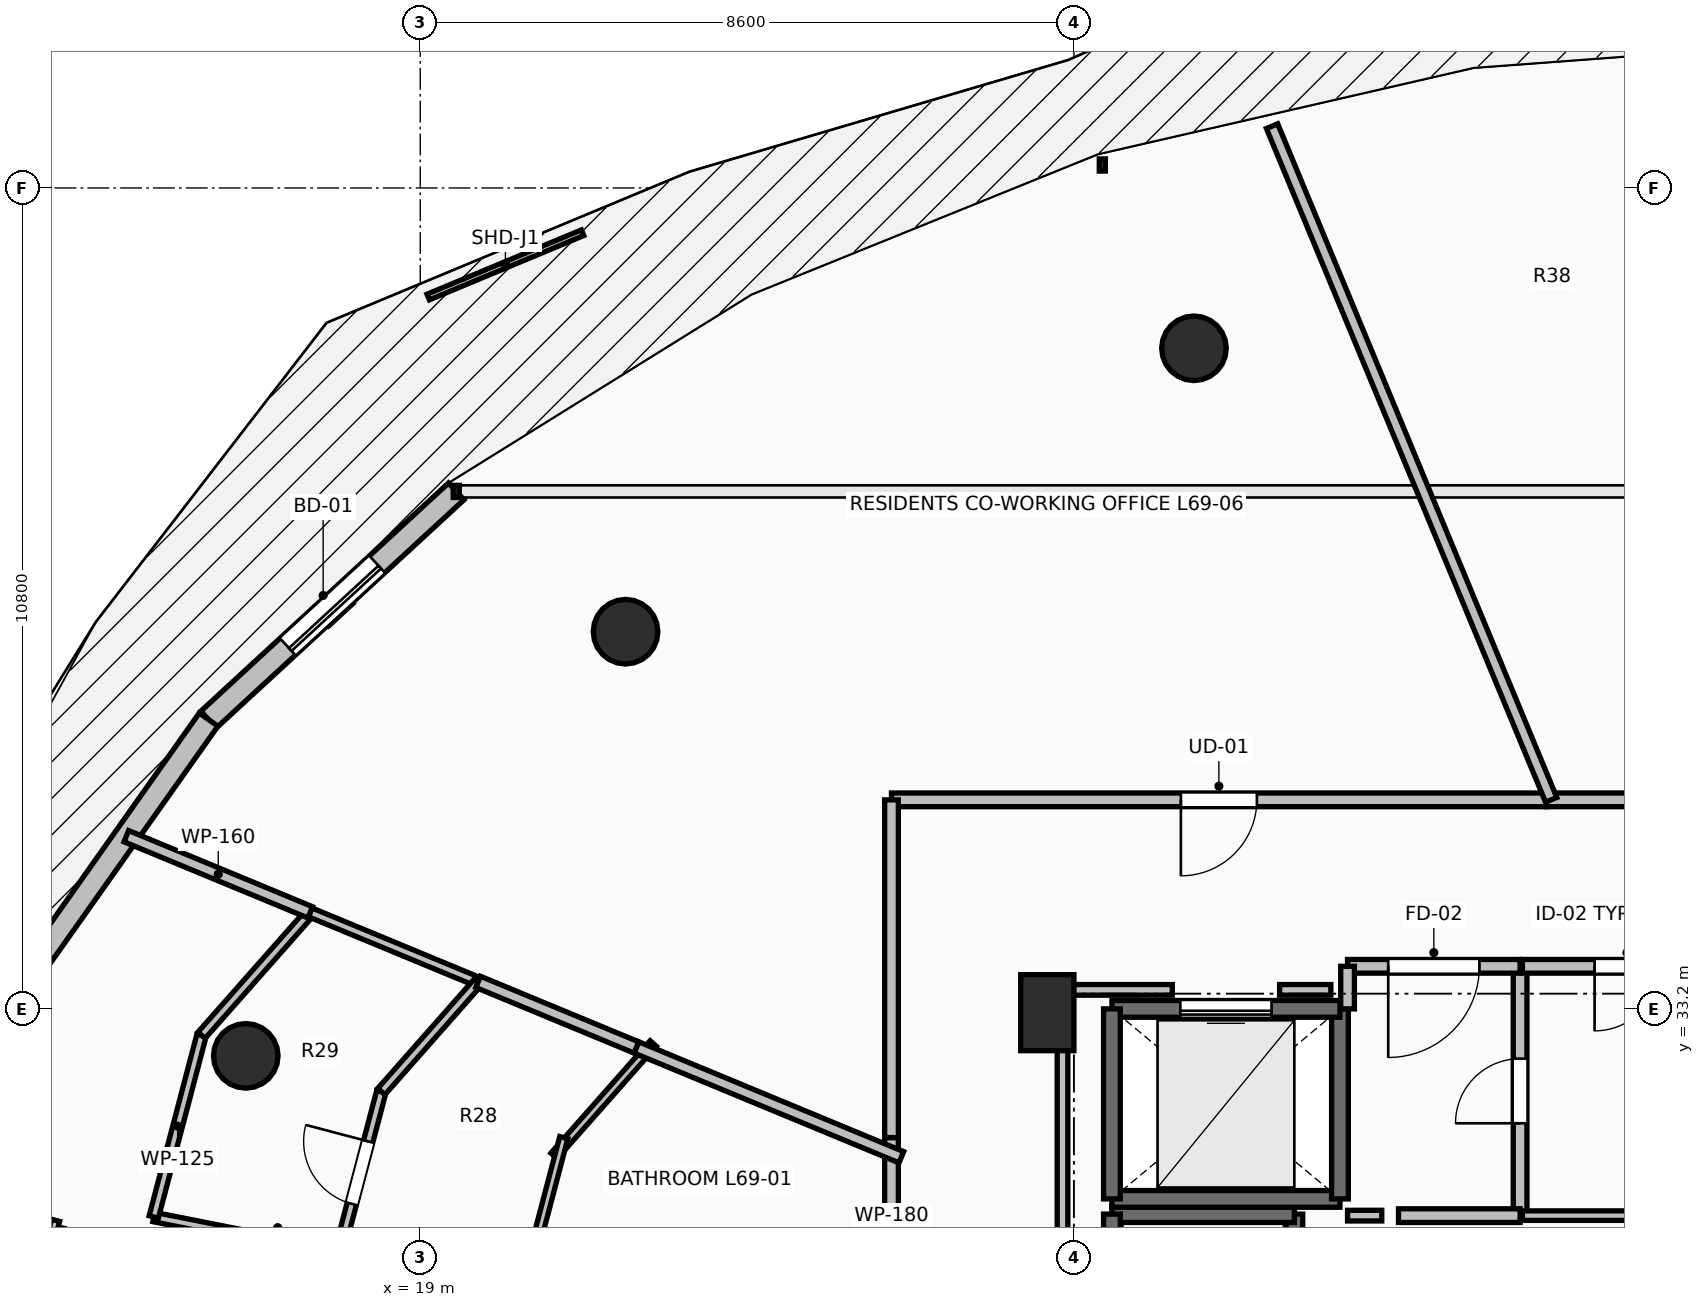
"""IFC4 building model, lengths in metres.
Left out: names, types, materials, properties, quantities, classifications, styles, units other than length and angle.
Written with IfcOpenShell. Run it as: python <this file> out.ifc"""

import sys

from ifc_helpers import new_model, si_unit, direction, frame, frame_2d, origin, origin_2d, place, context, subcontext, project, spatial, rectangle, circle, extrude, element, fill, save


model = new_model("IFC4")
c1 = context("Model", 3, precision=1e-05, world=origin(), true_north=direction((0.0, 1.0)))
c2 = subcontext(c1, "Body", "Model", "MODEL_VIEW")
j1 = project(units=[si_unit("LENGTHUNIT", "METRE"), si_unit("PLANEANGLEUNIT", "RADIAN")], contexts=[c1])
p1 = place(None, origin())
s1 = spatial("IfcSite", under=j1, at=p1, CompositionType="ELEMENT")
p2 = place(p1, origin())
s2 = spatial("IfcBuilding", under=s1, at=p2, CompositionType="ELEMENT")
p3 = place(p2, frame((0.0, 0.0, 255.55)))
s3 = spatial("IfcBuildingStorey", under=s2, at=p3, CompositionType="ELEMENT", Elevation=255.55)
for number, where, z_axis, x_axis in (
    (1, (29.179, 41.891, 0.0), (0.0, 0.0, 1.0), (-0.383, 0.924, 0.0)),
    (2, (21.701, 38.162, 0.0), (0.0, 0.0, 1.0), (-0.707, 0.707, 0.0)),
    (3, (16.705, 32.582, 0.0), (0.0, 0.0, 1.0), (-0.924, 0.383, 0.0)),
):
    element("IfcColumn", number, at=place(p3, frame(where, z_axis=z_axis, x_axis=x_axis)), inside=s3, PredefinedType="COLUMN", context=c2, shape_type="SweptSolid", body=[
        extrude(circle(Radius=0.425, at=origin_2d()), origin(), (0.0, 0.0, 1.0), 3.55),
    ])
p4 = place(p3, frame((27.25, 33.15, 0.0), z_axis=(0.0, 0.0, 1.0), x_axis=(1.0, 0.0, 0.0)))
e4 = element("IfcColumn", 4, at=p4, inside=s3, PredefinedType="PILASTER", context=c2, shape_type="SweptSolid", body=[
    extrude(rectangle(XDim=0.7, YDim=1.0, at=origin_2d()), origin(), (0.0, 0.0, 1.0), 3.55),
])
p5 = place(p3, frame((19.474, 40.008, 0.0), z_axis=(0.0, 0.0, 1.0), x_axis=(-0.735445373611, -0.677584018727, 0.0)))
e5 = element("IfcWall", 5, at=p5, inside=s3, PredefinedType="STANDARD", context=c2, shape_type="SweptSolid", body=[
    extrude(rectangle(XDim=4.43, YDim=0.3, at=frame_2d((2.215, 0.0))), origin(), (0.0, 0.0, 1.0), 3.29),
])
p6 = place(p5, frame((1.415, 0.0, 0.0)))
e6 = element("IfcOpeningElement", 6, at=p6, cuts=e5, PredefinedType="OPENING", context=c2, shape_type="SweptSolid", body=[
    extrude(rectangle(XDim=1.6, YDim=2.3, at=frame_2d((0.8, 1.15))), frame((0.0, 0.165, 0.0), z_axis=(0.0, -1.0, 0.0), x_axis=(1.0, 0.0, 0.0)), (0.0, 0.0, 1.0), 0.33),
])
p7 = place(p3, frame((16.216, 37.006, 0.0), z_axis=(0.0, 0.0, 1.0), x_axis=(-0.577261247247, -0.816559521668, 0.0)))
e7 = element("IfcWall", 7, at=p7, inside=s3, PredefinedType="STANDARD", context=c2, shape_type="SweptSolid", body=[
    extrude(rectangle(XDim=4.194, YDim=0.3, at=frame_2d((2.097, 0.0))), origin(), (0.0, 0.0, 1.0), 3.29),
])
p8 = place(p3, frame((30.5, 28.0, 0.0), z_axis=(0.0, 0.0, 1.0), x_axis=(0.0, 1.0, 0.0)))
e8 = element("IfcWall", 8, at=p8, inside=s3, PredefinedType="SHEAR", context=c2, shape_type="SweptSolid", body=[
    extrude(rectangle(XDim=2.5, YDim=0.22, at=frame_2d((1.25, 0.0))), origin(), (0.0, 0.0, 1.0), 3.29),
])
p9 = place(p3, frame((30.5, 30.5, 0.0), z_axis=(0.0, 0.0, 1.0), x_axis=(-1.0, 0.0, 0.0)))
e9 = element("IfcWall", 9, at=p9, inside=s3, PredefinedType="SHEAR", context=c2, shape_type="SweptSolid", body=[
    extrude(rectangle(XDim=2.4, YDim=0.22, at=frame_2d((1.2, 0.0))), origin(), (0.0, 0.0, 1.0), 3.29),
])
p10 = place(p3, frame((28.1, 30.5, 0.0), z_axis=(0.0, 0.0, 1.0), x_axis=(0.0, -1.0, 0.0)))
e10 = element("IfcWall", 10, at=p10, inside=s3, PredefinedType="SHEAR", context=c2, shape_type="SweptSolid", body=[
    extrude(rectangle(XDim=2.5, YDim=0.22, at=frame_2d((1.25, 0.0))), origin(), (0.0, 0.0, 1.0), 3.29),
])
p11 = place(p3, frame((28.1, 30.7, 0.0), z_axis=(0.0, 0.0, 1.0), x_axis=(1.0, 0.0, 0.0)))
e11 = element("IfcWall", 11, at=p11, inside=s3, PredefinedType="SOLIDWALL", context=c2, shape_type="SweptSolid", body=[
    extrude(rectangle(XDim=3.0, YDim=0.22, at=frame_2d((1.5, 0.0))), origin(), (0.0, 0.0, 1.0), 3.29),
])
p12 = place(p3, frame((31.1, 30.7, 0.0), z_axis=(0.0, 0.0, 1.0), x_axis=(0.0, 1.0, 0.0)))
e12 = element("IfcWall", 12, at=p12, inside=s3, PredefinedType="SOLIDWALL", context=c2, shape_type="SweptSolid", body=[
    extrude(rectangle(XDim=2.5, YDim=0.22, at=frame_2d((1.25, 0.0))), origin(), (0.0, 0.0, 1.0), 3.29),
])
p13 = place(p3, frame((31.1, 33.2, 0.0), z_axis=(0.0, 0.0, 1.0), x_axis=(-1.0, 0.0, 0.0)))
e13 = element("IfcWall", 13, at=p13, inside=s3, PredefinedType="SOLIDWALL", context=c2, shape_type="SweptSolid", body=[
    extrude(rectangle(XDim=3.0, YDim=0.22, at=frame_2d((1.5, 0.0))), origin(), (0.0, 0.0, 1.0), 3.29),
])
p14 = place(p13, frame((0.9, 0.0, 0.0)))
e14 = element("IfcOpeningElement", 14, at=p14, cuts=e13, PredefinedType="OPENING", context=c2, shape_type="SweptSolid", body=[
    extrude(rectangle(XDim=1.2, YDim=2.2, at=frame_2d((0.6, 1.1))), frame((0.0, 0.125, 0.0), z_axis=(0.0, -1.0, 0.0), x_axis=(1.0, 0.0, 0.0)), (0.0, 0.0, 1.0), 0.25),
])
p15 = place(p3, frame((28.1, 33.2, 0.0), z_axis=(0.0, 0.0, 1.0), x_axis=(0.0, -1.0, 0.0)))
e15 = element("IfcWall", 15, at=p15, inside=s3, PredefinedType="SOLIDWALL", context=c2, shape_type="SweptSolid", body=[
    extrude(rectangle(XDim=2.5, YDim=0.22, at=frame_2d((1.25, 0.0))), origin(), (0.0, 0.0, 1.0), 3.29),
])
p16 = place(p3, frame((33.47, 30.48, 0.0), z_axis=(0.0, 0.0, 1.0), x_axis=(0.0, 1.0, 0.0)))
e16 = element("IfcWall", 16, at=p16, inside=s3, PredefinedType="PARTITIONING", context=c2, shape_type="SweptSolid", body=[
    extrude(rectangle(XDim=3.28, YDim=0.18, at=frame_2d((1.64, 0.0))), origin(), (0.0, 0.0, 1.0), 3.29),
])
p17 = place(p16, frame((1.215, 0.0, 0.0)))
e17 = element("IfcOpeningElement", 17, at=p17, cuts=e16, PredefinedType="OPENING", context=c2, shape_type="SweptSolid", body=[
    extrude(rectangle(XDim=0.85, YDim=2.1, at=frame_2d((0.425, 1.05))), frame((0.0, 0.105, 0.0), z_axis=(0.0, -1.0, 0.0), x_axis=(1.0, 0.0, 0.0)), (0.0, 0.0, 1.0), 0.21),
])
p18 = place(p3, frame((31.87, 30.48, 0.0), z_axis=(0.0, 0.0, 1.0), x_axis=(1.0, 0.0, 0.0)))
e18 = element("IfcWall", 18, at=p18, inside=s3, PredefinedType="PARTITIONING", context=c2, shape_type="SweptSolid", body=[
    extrude(rectangle(XDim=1.6, YDim=0.18, at=frame_2d((0.8, 0.0))), origin(), (0.0, 0.0, 1.0), 3.29),
])
p19 = place(p3, frame((33.47, 33.76, 0.0), z_axis=(0.0, 0.0, 1.0), x_axis=(-1.0, 0.0, 0.0)))
e19 = element("IfcWall", 19, at=p19, inside=s3, PredefinedType="PARTITIONING", context=c2, shape_type="SweptSolid", body=[
    extrude(rectangle(XDim=2.27, YDim=0.18, at=frame_2d((1.135, 0.0))), origin(), (0.0, 0.0, 1.0), 3.29),
])
p20 = place(p19, frame((0.535, 0.0, 0.0)))
e20 = element("IfcOpeningElement", 20, at=p20, cuts=e19, PredefinedType="OPENING", context=c2, shape_type="SweptSolid", body=[
    extrude(rectangle(XDim=1.2, YDim=2.15, at=frame_2d((0.6, 1.075))), frame((0.0, 0.105, 0.0), z_axis=(0.0, -1.0, 0.0), x_axis=(1.0, 0.0, 0.0)), (0.0, 0.0, 1.0), 0.21),
])
p21 = place(p3, frame((31.2, 33.76, 0.0), z_axis=(0.0, 0.0, 1.0), x_axis=(0.0, -1.0, 0.0)))
e21 = element("IfcWall", 21, at=p21, inside=s3, PredefinedType="PARTITIONING", context=c2, shape_type="SweptSolid", body=[
    extrude(rectangle(XDim=0.56, YDim=0.18, at=frame_2d((0.28, 0.0))), origin(), (0.0, 0.0, 1.0), 3.29),
])
p22 = place(p3, frame((33.5, 30.48, 0.0), z_axis=(0.0, 0.0, 1.0), x_axis=(1.0, 0.0, 0.0)))
e22 = element("IfcWall", 22, at=p22, inside=s3, PredefinedType="PARTITIONING", context=c2, shape_type="SweptSolid", body=[
    extrude(rectangle(XDim=2.75, YDim=0.125, at=frame_2d((1.375, 0.0))), origin(), (0.0, 0.0, 1.0), 2.482),
])
p23 = place(p3, frame((36.25, 33.76, 0.0), z_axis=(0.0, 0.0, 1.0), x_axis=(-1.0, 0.0, 0.0)))
e23 = element("IfcWall", 23, at=p23, inside=s3, PredefinedType="PARTITIONING", context=c2, shape_type="SweptSolid", body=[
    extrude(rectangle(XDim=2.75, YDim=0.18, at=frame_2d((1.375, 0.0))), origin(), (0.0, 0.0, 1.0), 3.29),
])
p24 = place(p23, frame((0.95, 0.0, 0.0)))
e24 = element("IfcOpeningElement", 24, at=p24, cuts=e23, PredefinedType="OPENING", context=c2, shape_type="SweptSolid", body=[
    extrude(rectangle(XDim=0.85, YDim=2.1, at=frame_2d((0.425, 1.05))), frame((0.0, 0.105, 0.0), z_axis=(0.0, -1.0, 0.0), x_axis=(1.0, 0.0, 0.0)), (0.0, 0.0, 1.0), 0.21),
])
p25 = place(p3, frame((25.2, 31.507, 0.0), z_axis=(0.0, 0.0, 1.0), x_axis=(0.0, -1.0, 0.0)))
e25 = element("IfcWall", 25, at=p25, inside=s3, PredefinedType="PARTITIONING", context=c2, shape_type="SweptSolid", body=[
    extrude(rectangle(XDim=3.048, YDim=0.18, at=frame_2d((1.524, 0.0))), origin(), (0.0, 0.0, 1.0), 2.482),
])
p26 = place(p3, frame((36.55, 35.95, 0.0), z_axis=(0.0, 0.0, 1.0), x_axis=(-1.0, 0.0, 0.0)))
e26 = element("IfcWall", 26, at=p26, inside=s3, PredefinedType="PARTITIONING", context=c2, shape_type="SweptSolid", body=[
    extrude(rectangle(XDim=2.736, YDim=0.18, at=frame_2d((1.368, 0.0))), origin(), (0.0, 0.0, 1.0), 3.29),
])
p27 = place(p3, frame((33.814, 35.95, 0.0), z_axis=(0.0, 0.0, 1.0), x_axis=(-1.0, 0.0, 0.0)))
e27 = element("IfcWall", 27, at=p27, inside=s3, PredefinedType="PARTITIONING", context=c2, shape_type="SweptSolid", body=[
    extrude(rectangle(XDim=8.614, YDim=0.18, at=frame_2d((4.307, 0.0))), origin(), (0.0, 0.0, 1.0), 2.482),
])
p28 = place(p27, frame((3.807, 0.0, 0.0)))
e28 = element("IfcOpeningElement", 28, at=p28, cuts=e27, PredefinedType="OPENING", context=c2, shape_type="SweptSolid", body=[
    extrude(rectangle(XDim=1.0, YDim=2.15, at=frame_2d((0.5, 1.075))), frame((0.0, 0.105, 0.0), z_axis=(0.0, -1.0, 0.0), x_axis=(1.0, 0.0, 0.0)), (0.0, 0.0, 1.0), 0.21),
])
p29 = place(p3, frame((25.2, 35.95, 0.0), z_axis=(0.0, 0.0, 1.0), x_axis=(0.0, -1.0, 0.0)))
e29 = element("IfcWall", 29, at=p29, inside=s3, PredefinedType="PARTITIONING", context=c2, shape_type="SweptSolid", body=[
    extrude(rectangle(XDim=4.443, YDim=0.18, at=frame_2d((2.221, 0.0))), origin(), (0.0, 0.0, 1.0), 2.482),
])
p30 = place(p3, frame((19.236, 29.72, 0.0), z_axis=(0.0, 0.0, 1.0), x_axis=(-0.980906665774, 0.194479081243, 0.0)))
e30 = element("IfcWall", 30, at=p30, inside=s3, PredefinedType="PARTITIONING", context=c2, shape_type="SweptSolid", body=[
    extrude(rectangle(XDim=3.815, YDim=0.125, at=frame_2d((1.907, 0.0))), origin(), (0.0, 0.0, 1.0), 2.874),
])
p31 = place(p30, frame((1.737, 0.0, 0.0)))
e31 = element("IfcOpeningElement", 31, at=p31, cuts=e30, PredefinedType="OPENING", context=c2, shape_type="SweptSolid", body=[
    extrude(rectangle(XDim=0.9, YDim=2.1, at=frame_2d((0.45, 1.05))), frame((0.0, 0.077, 0.0), z_axis=(0.0, -1.0, 0.0), x_axis=(1.0, 0.0, 0.0)), (0.0, 0.0, 1.0), 0.155),
])
p32 = place(p3, frame((15.494, 30.462, 0.0), z_axis=(0.0, 0.0, 1.0), x_axis=(0.254459276467, 0.967083489995, 0.0)))
e32 = element("IfcWall", 32, at=p32, inside=s3, PredefinedType="PARTITIONING", context=c2, shape_type="SweptSolid", body=[
    extrude(rectangle(XDim=2.472, YDim=0.125, at=frame_2d((1.236, 0.0))), origin(), (0.0, 0.0, 1.0), 3.29),
])
p33 = place(p3, frame((16.123, 32.853, 0.0), z_axis=(0.0, 0.0, 1.0), x_axis=(0.662205183315, 0.749322557508, 0.0)))
e33 = element("IfcWall", 33, at=p33, inside=s3, PredefinedType="PARTITIONING", context=c2, shape_type="SweptSolid", body=[
    extrude(rectangle(XDim=2.158, YDim=0.125, at=frame_2d((1.079, 0.0))), origin(), (0.0, 0.0, 1.0), 3.29),
])
p34 = place(p3, frame((17.552, 34.47, 0.0), z_axis=(0.0, 0.0, 1.0), x_axis=(0.923932252837, -0.382556129434, 0.0)))
e34 = element("IfcWall", 34, at=p34, inside=s3, PredefinedType="PARTITIONING", context=c2, shape_type="SweptSolid", body=[
    extrude(rectangle(XDim=2.392, YDim=0.125, at=frame_2d((1.196, 0.0))), origin(), (0.0, 0.0, 1.0), 2.874),
])
p35 = place(p3, frame((12.45, 30.592, 0.0), z_axis=(0.0, 0.0, 1.0), x_axis=(0.984212226867, -0.176992351488, 0.0)))
e35 = element("IfcWall", 35, at=p35, inside=s3, PredefinedType="PARTITIONING", context=c2, shape_type="SweptSolid", body=[
    extrude(rectangle(XDim=1.884, YDim=0.11, at=frame_2d((0.942, 0.0))), origin(), (0.0, 0.0, 1.0), 3.29),
])
p36 = place(p3, frame((14.203, 30.418, 0.0), z_axis=(0.0, 0.0, 1.0), x_axis=(-0.254460123068, -0.967083267236, 0.0)))
e36 = element("IfcWall", 36, at=p36, inside=s3, PredefinedType="PARTITIONING", context=c2, shape_type="SweptSolid", body=[
    extrude(rectangle(XDim=4.709, YDim=0.11, at=frame_2d((2.354, 0.0))), origin(), (0.0, 0.0, 1.0), 3.29),
])
p37 = place(p36, frame((1.904, 0.0, 0.0)))
e37 = element("IfcOpeningElement", 37, at=p37, cuts=e36, PredefinedType="OPENING", context=c2, shape_type="SweptSolid", body=[
    extrude(rectangle(XDim=0.9, YDim=2.1, at=frame_2d((0.45, 1.05))), frame((0.0, 0.07, 0.0), z_axis=(0.0, -1.0, 0.0), x_axis=(1.0, 0.0, 0.0)), (0.0, 0.0, 1.0), 0.14),
])
p38 = place(p3, frame((17.552, 34.47, 0.0), z_axis=(0.0, 0.0, 1.0), x_axis=(-0.9239134198, 0.382601610965, 0.0)))
e38 = element("IfcWall", 38, at=p38, inside=s3, PredefinedType="PARTITIONING", context=c2, shape_type="SweptSolid", body=[
    extrude(rectangle(XDim=2.618, YDim=0.16, at=frame_2d((1.309, 0.0))), origin(), (0.0, 0.0, 1.0), 3.29),
])
p39 = place(p3, frame((17.927, 29.98, 0.0), z_axis=(0.0, 0.0, 1.0), x_axis=(0.254476946675, 0.967078840432, 0.0)))
e39 = element("IfcWall", 39, at=p39, inside=s3, PredefinedType="PARTITIONING", context=c2, shape_type="SweptSolid", body=[
    extrude(rectangle(XDim=2.205, YDim=0.125, at=frame_2d((1.102, 0.0))), origin(), (0.0, 0.0, 1.0), 2.482),
])
p40 = place(p39, frame((0.677, 0.0, 0.0)))
e40 = element("IfcOpeningElement", 40, at=p40, cuts=e39, PredefinedType="OPENING", context=c2, shape_type="SweptSolid", body=[
    extrude(rectangle(XDim=0.85, YDim=2.1, at=frame_2d((0.425, 1.05))), frame((0.0, 0.077, 0.0), z_axis=(0.0, -1.0, 0.0), x_axis=(1.0, 0.0, 0.0)), (0.0, 0.0, 1.0), 0.155),
])
p41 = place(p3, frame((18.488, 32.112, 0.0), z_axis=(0.0, 0.0, 1.0), x_axis=(0.661856531983, 0.749630529709, 0.0)))
e41 = element("IfcWall", 41, at=p41, inside=s3, PredefinedType="PARTITIONING", context=c2, shape_type="SweptSolid", body=[
    extrude(rectangle(XDim=1.925, YDim=0.125, at=frame_2d((0.962, 0.0))), origin(), (0.0, 0.0, 1.0), 2.482),
])
p42 = place(p3, frame((22.066, 32.744, 0.0), z_axis=(0.0, 0.0, 1.0), x_axis=(-0.662047420969, -0.749461948593, 0.0)))
e42 = element("IfcWall", 42, at=p42, inside=s3, PredefinedType="PARTITIONING", context=c2, shape_type="SweptSolid", body=[
    extrude(rectangle(XDim=1.972, YDim=0.11, at=frame_2d((0.986, 0.0))), origin(), (0.0, 0.0, 1.0), 3.29),
])
p43 = place(p3, frame((20.889, 31.506, 0.0), z_axis=(0.0, 0.0, 1.0), x_axis=(-0.254406599134, -0.967097348935, 0.0)))
e43 = element("IfcWall", 43, at=p43, inside=s3, PredefinedType="PARTITIONING", context=c2, shape_type="SweptSolid", body=[
    extrude(rectangle(XDim=2.218, YDim=0.11, at=frame_2d((1.109, 0.0))), origin(), (0.0, 0.0, 1.0), 2.482),
])
p44 = place(p3, frame((25.329, 31.248, 0.0), z_axis=(0.0, 0.0, 1.0), x_axis=(-0.923827524065, 0.382808967736, 0.0)))
e44 = element("IfcWall", 44, at=p44, inside=s3, PredefinedType="PARTITIONING", context=c2, shape_type="SweptSolid", body=[
    extrude(rectangle(XDim=3.773, YDim=0.16, at=frame_2d((1.886, 0.0))), origin(), (0.0, 0.0, 1.0), 2.936),
])
p45 = place(p3, frame((21.844, 32.693, 0.0), z_axis=(0.0, 0.0, 1.0), x_axis=(-0.92387949598, 0.382683520559, 0.0)))
e45 = element("IfcWall", 45, at=p45, inside=s3, PredefinedType="PARTITIONING", context=c2, shape_type="SweptSolid", body=[
    extrude(rectangle(XDim=2.253, YDim=0.16, at=frame_2d((1.127, 0.0))), origin(), (0.0, 0.0, 1.0), 3.022),
])
p46 = place(p3, frame((30.207, 44.813, 0.0), z_axis=(0.0, 0.0, 1.0), x_axis=(0.38274436158, -0.92385429245, 0.0)))
e46 = element("IfcWall", 46, at=p46, inside=s3, PredefinedType="PARTITIONING", context=c2, shape_type="SweptSolid", body=[
    extrude(rectangle(XDim=9.594, YDim=0.16, at=frame_2d((4.797, 0.0))), origin(), (0.0, 0.0, 1.0), 2.482),
])
p47 = place(p3, frame((31.2, 30.48, 0.0), z_axis=(0.0, 0.0, 1.0), x_axis=(1.0, 0.0, 0.0)))
e47 = element("IfcWall", 47, at=p47, inside=s3, PredefinedType="PARTITIONING", context=c2, shape_type="SweptSolid", body=[
    extrude(rectangle(XDim=0.45, YDim=0.14, at=frame_2d((0.225, 0.0))), origin(), (0.0, 0.0, 1.0), 3.29),
])
p48 = place(p3, frame((30.98, 33.45, 0.0), z_axis=(0.0, 0.0, 1.0), x_axis=(-1.0, 0.0, 0.0)))
e48 = element("IfcWall", 48, at=p48, inside=s3, PredefinedType="PARTITIONING", context=c2, shape_type="SweptSolid", body=[
    extrude(rectangle(XDim=0.674, YDim=0.14, at=frame_2d((0.337, 0.0))), origin(), (0.0, 0.0, 1.0), 3.29),
])
p49 = place(p3, frame((28.894, 33.45, 0.0), z_axis=(0.0, 0.0, 1.0), x_axis=(-1.0, 0.0, 0.0)))
e49 = element("IfcWall", 49, at=p49, inside=s3, PredefinedType="PARTITIONING", context=c2, shape_type="SweptSolid", body=[
    extrude(rectangle(XDim=1.444, YDim=0.14, at=frame_2d((0.722, 0.0))), origin(), (0.0, 0.0, 1.0), 2.482),
])
p50 = place(p3, frame((27.45, 33.45, 0.0), z_axis=(0.0, 0.0, 1.0), x_axis=(0.0, -1.0, 0.0)))
e50 = element("IfcWall", 50, at=p50, inside=s3, PredefinedType="PARTITIONING", context=c2, shape_type="SweptSolid", body=[
    extrude(rectangle(XDim=5.254, YDim=0.14, at=frame_2d((2.627, 0.0))), origin(), (0.0, 0.0, 1.0), 2.482),
])
p51 = place(p6, origin())
e51 = element("IfcDoor", 51, at=p51, inside=s3, OperationType="SLIDING_TO_LEFT", PredefinedType="DOOR", context=c2, shape_type="SweptSolid", body=[
    extrude(rectangle(XDim=1.6, YDim=2.3, at=frame_2d((0.8, 1.15))), frame((0.0, 0.025, 0.0), z_axis=(0.0, -1.0, 0.0), x_axis=(1.0, 0.0, 0.0)), (0.0, 0.0, 1.0), 0.05),
])
fill(e6, e51)
p52 = place(p14, origin())
e52 = element("IfcDoor", 52, at=p52, inside=s3, OperationType="SLIDING_TO_LEFT", PredefinedType="DOOR", context=c2, shape_type="SweptSolid", body=[
    extrude(rectangle(XDim=1.2, YDim=2.2, at=frame_2d((0.6, 1.1))), frame((0.0, 0.025, 0.0), z_axis=(0.0, -1.0, 0.0), x_axis=(1.0, 0.0, 0.0)), (0.0, 0.0, 1.0), 0.05),
])
fill(e14, e52)
p53 = place(p17, origin())
e53 = element("IfcDoor", 53, at=p53, inside=s3, OperationType="SINGLE_SWING_LEFT", PredefinedType="DOOR", context=c2, shape_type="SweptSolid", body=[
    extrude(rectangle(XDim=0.85, YDim=2.1, at=frame_2d((0.425, 1.05))), frame((0.0, 0.025, 0.0), z_axis=(0.0, -1.0, 0.0), x_axis=(1.0, 0.0, 0.0)), (0.0, 0.0, 1.0), 0.05),
])
fill(e17, e53)
p54 = place(p20, origin())
e54 = element("IfcDoor", 54, at=p54, inside=s3, OperationType="SINGLE_SWING_RIGHT", PredefinedType="DOOR", context=c2, shape_type="SweptSolid", body=[
    extrude(rectangle(XDim=1.2, YDim=2.15, at=frame_2d((0.6, 1.075))), frame((0.0, 0.025, 0.0), z_axis=(0.0, -1.0, 0.0), x_axis=(1.0, 0.0, 0.0)), (0.0, 0.0, 1.0), 0.05),
])
fill(e20, e54)
p55 = place(p24, origin())
e55 = element("IfcDoor", 55, at=p55, inside=s3, OperationType="SINGLE_SWING_RIGHT", PredefinedType="DOOR", context=c2, shape_type="SweptSolid", body=[
    extrude(rectangle(XDim=0.85, YDim=2.1, at=frame_2d((0.425, 1.05))), frame((0.0, 0.025, 0.0), z_axis=(0.0, -1.0, 0.0), x_axis=(1.0, 0.0, 0.0)), (0.0, 0.0, 1.0), 0.05),
])
fill(e24, e55)
p56 = place(p28, origin())
e56 = element("IfcDoor", 56, at=p56, inside=s3, OperationType="SINGLE_SWING_RIGHT", PredefinedType="DOOR", context=c2, shape_type="SweptSolid", body=[
    extrude(rectangle(XDim=1.0, YDim=2.15, at=frame_2d((0.5, 1.075))), frame((0.0, 0.025, 0.0), z_axis=(0.0, -1.0, 0.0), x_axis=(1.0, 0.0, 0.0)), (0.0, 0.0, 1.0), 0.05),
])
fill(e28, e56)
p57 = place(p40, origin())
e57 = element("IfcDoor", 57, at=p57, inside=s3, OperationType="SINGLE_SWING_RIGHT", PredefinedType="DOOR", context=c2, shape_type="SweptSolid", body=[
    extrude(rectangle(XDim=0.85, YDim=2.1, at=frame_2d((0.425, 1.05))), frame((0.0, 0.025, 0.0), z_axis=(0.0, -1.0, 0.0), x_axis=(1.0, 0.0, 0.0)), (0.0, 0.0, 1.0), 0.05),
])
fill(e40, e57)
save(model, sys.argv[1])
